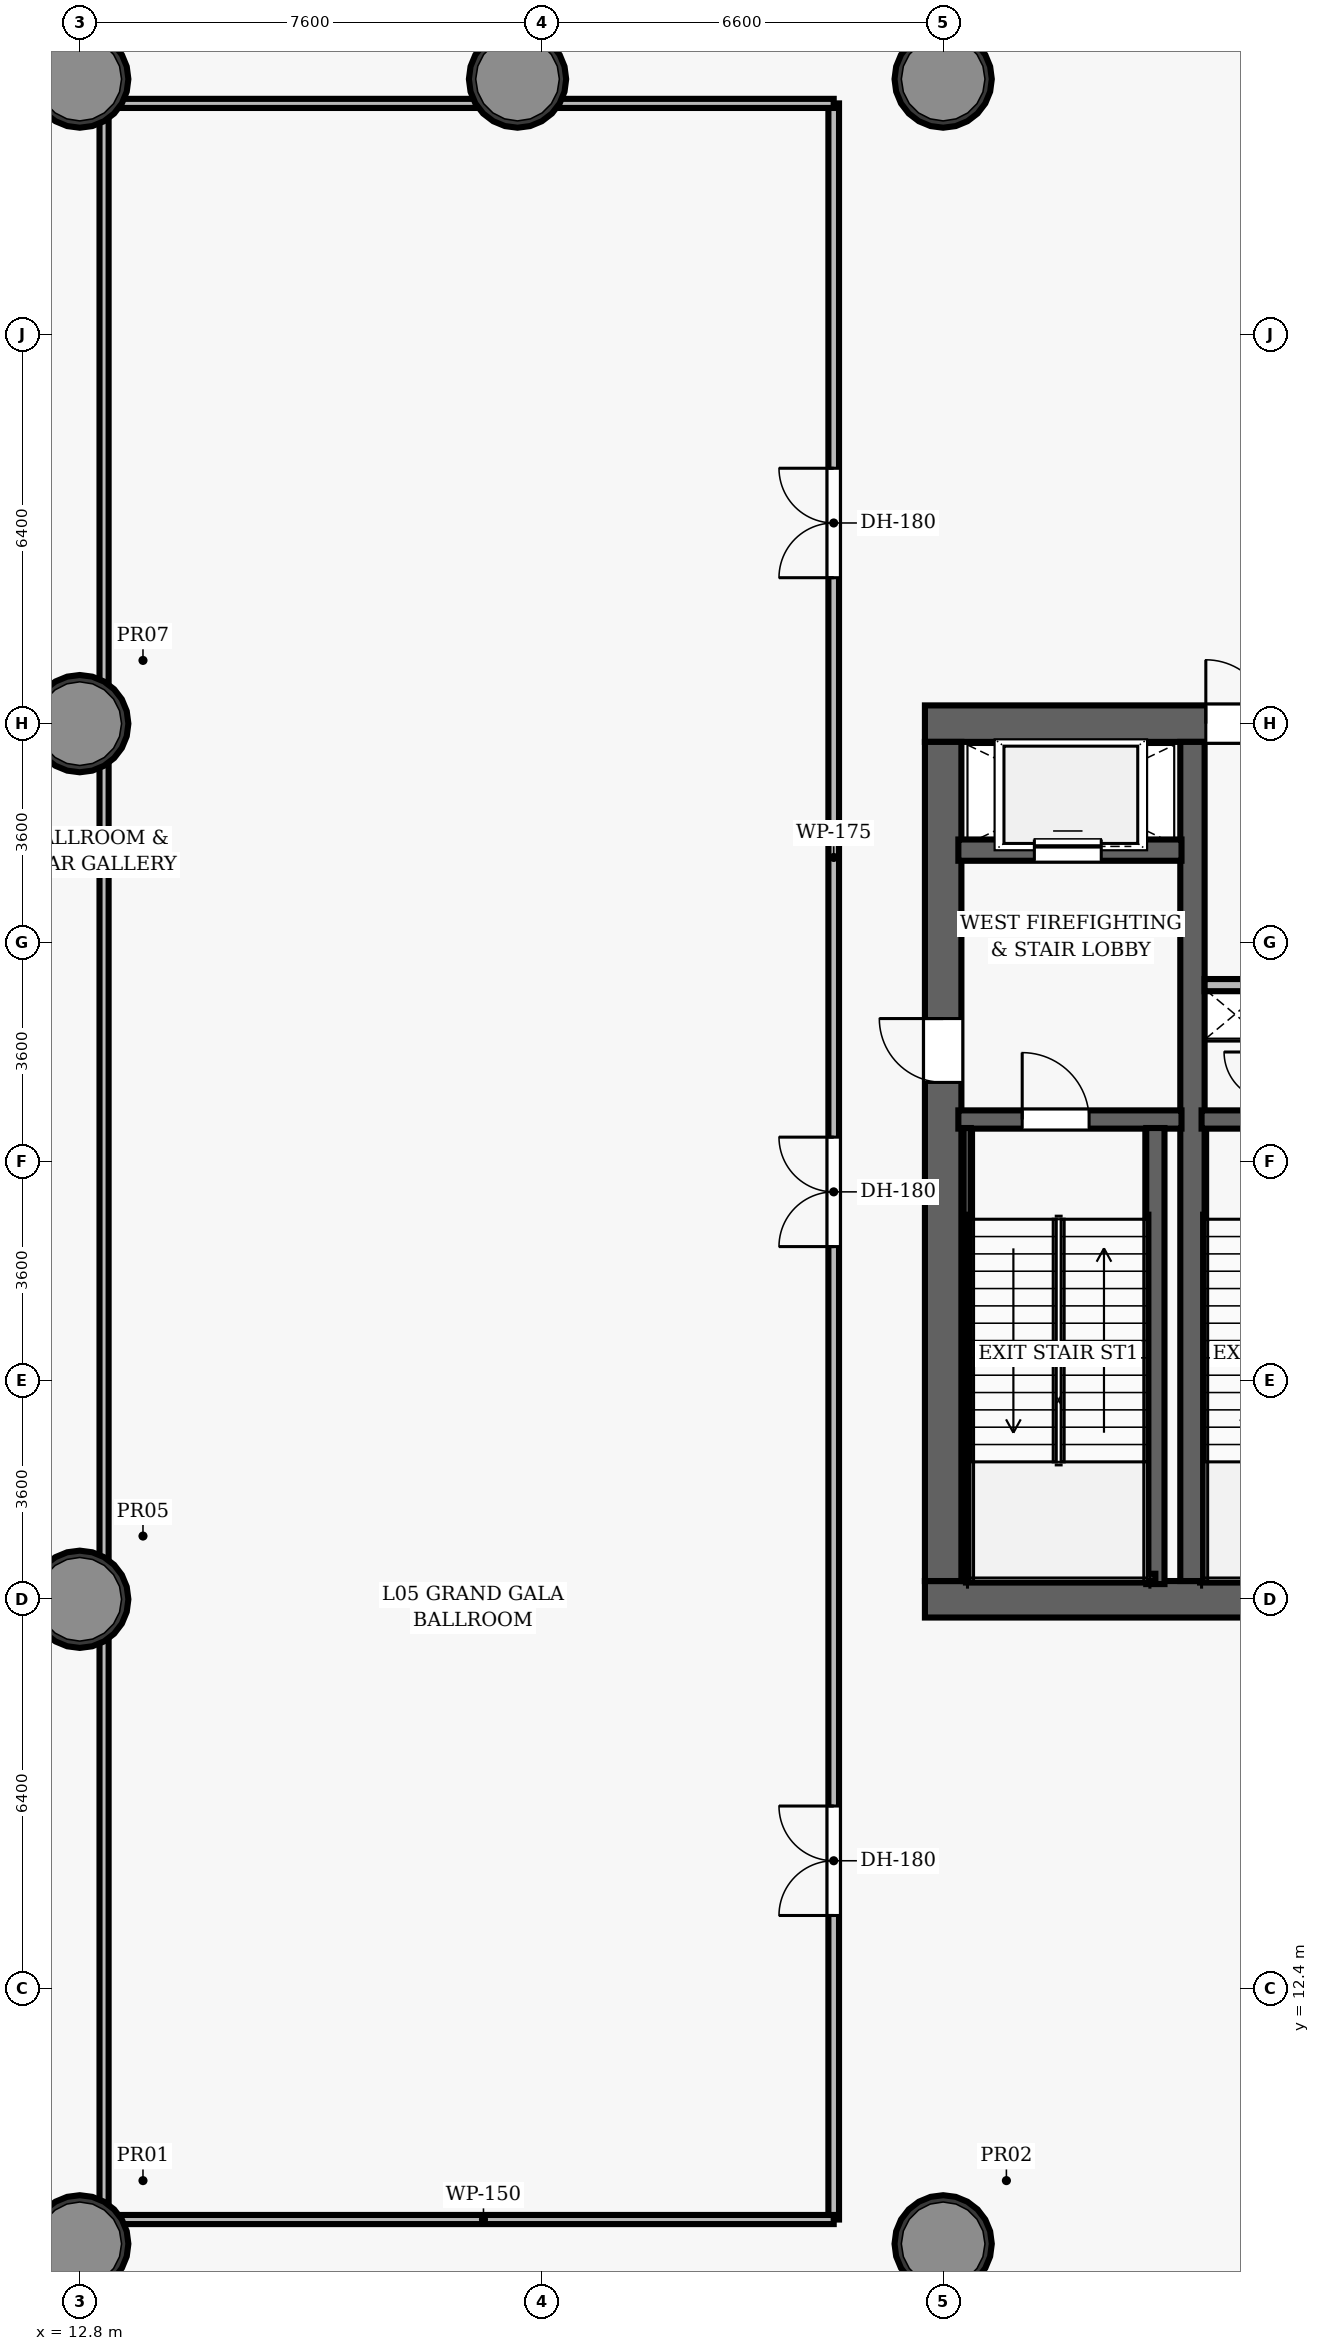
"""IFC4 building model, lengths in metres.
Left out: names, types, materials, properties, quantities, classifications, styles, units other than length and angle.
Written with IfcOpenShell. Run it as: python <this file> out.ifc"""

import sys

from ifc_helpers import new_model, si_unit, direction, frame, frame_2d, origin, origin_2d, place, context, subcontext, project, spatial, rectangle, hollow_circle, extrude, element, fill, save


model = new_model("IFC4")
c1 = context("Model", 3, precision=1e-05, world=origin(), true_north=direction((0.0, 1.0)))
c2 = subcontext(c1, "Body", "Model", "MODEL_VIEW")
j1 = project(units=[si_unit("LENGTHUNIT", "METRE"), si_unit("PLANEANGLEUNIT", "RADIAN")], contexts=[c1])
p1 = place(None, origin())
s1 = spatial("IfcSite", under=j1, at=p1, CompositionType="ELEMENT")
p2 = place(p1, origin())
s2 = spatial("IfcBuilding", under=s1, at=p2, CompositionType="ELEMENT")
p3 = place(p2, frame((0.0, 0.0, 30.0)))
s3 = spatial("IfcBuildingStorey", under=s2, at=p3, CompositionType="ELEMENT", Elevation=30.0)
p4 = place(p3, frame((26.7, 18.8, 0.0), z_axis=(0.0, 0.0, 1.0), x_axis=(1.0, 0.0, 0.0)))
e1 = element("IfcWall", 1, at=p4, inside=s3, PredefinedType="SHEAR", context=c2, shape_type="SweptSolid", body=[
    extrude(rectangle(XDim=22.6, YDim=0.6, at=frame_2d((11.3, 0.0))), origin(), (0.0, 0.0, 1.0), 5.4),
])
p5 = place(p4, frame((14.52, 0.0, 0.0)))
e2 = element("IfcOpeningElement", 2, at=p5, cuts=e1, PredefinedType="OPENING", context=c2, shape_type="SweptSolid", body=[
    extrude(rectangle(XDim=1.05, YDim=2.15, at=frame_2d((0.525, 1.075))), frame((0.0, 0.31, 0.0), z_axis=(0.0, -1.0, 0.0), x_axis=(1.0, 0.0, 0.0)), (0.0, 0.0, 1.0), 0.62),
])
p6 = place(p3, frame((26.7, 33.2, 0.0), z_axis=(0.0, 0.0, 1.0), x_axis=(1.0, 0.0, 0.0)))
e3 = element("IfcWall", 3, at=p6, inside=s3, PredefinedType="SHEAR", context=c2, shape_type="SweptSolid", body=[
    extrude(rectangle(XDim=22.6, YDim=0.6, at=frame_2d((11.3, 0.0))), origin(), (0.0, 0.0, 1.0), 5.4),
])
p7 = place(p6, frame((4.62, 0.0, 0.0)))
e4 = element("IfcOpeningElement", 4, at=p7, cuts=e3, PredefinedType="OPENING", context=c2, shape_type="SweptSolid", body=[
    extrude(rectangle(XDim=1.05, YDim=2.15, at=frame_2d((0.525, 1.075))), frame((0.0, 0.31, 0.0), z_axis=(0.0, -1.0, 0.0), x_axis=(1.0, 0.0, 0.0)), (0.0, 0.0, 1.0), 0.62),
])
p8 = place(p6, frame((14.52, 0.0, 0.0)))
e5 = element("IfcOpeningElement", 5, at=p8, cuts=e3, PredefinedType="OPENING", context=c2, shape_type="SweptSolid", body=[
    extrude(rectangle(XDim=1.05, YDim=2.15, at=frame_2d((0.525, 1.075))), frame((0.0, 0.31, 0.0), z_axis=(0.0, -1.0, 0.0), x_axis=(1.0, 0.0, 0.0)), (0.0, 0.0, 1.0), 0.62),
])
p9 = place(p3, frame((27.0, 19.1, 0.0), z_axis=(0.0, 0.0, 1.0), x_axis=(0.0, 1.0, 0.0)))
e6 = element("IfcWall", 6, at=p9, inside=s3, PredefinedType="SHEAR", context=c2, shape_type="SweptSolid", body=[
    extrude(rectangle(XDim=13.8, YDim=0.6, at=frame_2d((6.9, 0.0))), origin(), (0.0, 0.0, 1.0), 5.4),
])
p10 = place(p9, frame((8.2, 0.0, 0.0)))
e7 = element("IfcOpeningElement", 7, at=p10, cuts=e6, PredefinedType="OPENING", context=c2, shape_type="SweptSolid", body=[
    extrude(rectangle(XDim=1.05, YDim=2.15, at=frame_2d((0.525, 1.075))), frame((0.0, 0.31, 0.0), z_axis=(0.0, -1.0, 0.0), x_axis=(1.0, 0.0, 0.0)), (0.0, 0.0, 1.0), 0.62),
])
p11 = place(p3, frame((31.1, 19.1, 0.0), z_axis=(0.0, 0.0, 1.0), x_axis=(0.0, 1.0, 0.0)))
e8 = element("IfcWall", 8, at=p11, inside=s3, PredefinedType="SHEAR", context=c2, shape_type="SweptSolid", body=[
    extrude(rectangle(XDim=13.8, YDim=0.4, at=frame_2d((6.9, 0.0))), origin(), (0.0, 0.0, 1.0), 5.4),
])
for number, where, z_axis, x_axis in (
    (9, (12.8, 8.2, 0.0), (0.0, 0.0, 1.0), (1.0, 0.0, 0.0)),
    (10, (27.0, 8.2, 0.0), (0.0, 0.0, 1.0), (1.0, 0.0, 0.0)),
    (11, (12.8, 18.8, 0.0), (0.0, 0.0, 1.0), (1.0, 0.0, 0.0)),
    (12, (12.8, 33.2, 0.0), (0.0, 0.0, 1.0), (1.0, 0.0, 0.0)),
    (13, (12.8, 43.8, 0.0), (0.0, 0.0, 1.0), (1.0, 0.0, 0.0)),
    (14, (20.0, 43.8, 0.0), (0.0, 0.0, 1.0), (1.0, 0.0, 0.0)),
    (15, (27.0, 43.8, 0.0), (0.0, 0.0, 1.0), (1.0, 0.0, 0.0)),
):
    element("IfcColumn", number, at=place(p3, frame(where, z_axis=z_axis, x_axis=x_axis)), inside=s3, PredefinedType="COLUMN", context=c2, shape_type="SweptSolid", body=[
        extrude(hollow_circle(Radius=0.8, WallThickness=0.06, at=origin_2d()), origin(), (0.0, 0.0, 1.0), 5.4),
    ])
p12 = place(p3, frame((27.25, 26.69, 0.0), z_axis=(0.0, 0.0, 1.0), x_axis=(1.0, 0.0, 0.0)))
e16 = element("IfcWall", 16, at=p12, inside=s3, PredefinedType="SHEAR", context=c2, shape_type="SweptSolid", body=[
    extrude(rectangle(XDim=3.67, YDim=0.3, at=frame_2d((1.835, 0.0))), origin(), (0.0, 0.0, 1.0), 5.4),
])
p13 = place(p12, frame((1.05, 0.0, 0.0)))
e17 = element("IfcOpeningElement", 17, at=p13, cuts=e16, PredefinedType="OPENING", context=c2, shape_type="SweptSolid", body=[
    extrude(rectangle(XDim=1.1, YDim=2.15, at=frame_2d((0.55, 1.075))), frame((0.0, 0.16, 0.0), z_axis=(0.0, -1.0, 0.0), x_axis=(1.0, 0.0, 0.0)), (0.0, 0.0, 1.0), 0.32),
])
p14 = place(p3, frame((30.49, 19.05, 0.0), z_axis=(0.0, 0.0, 1.0), x_axis=(0.0, 1.0, 0.0)))
e18 = element("IfcWall", 18, at=p14, inside=s3, PredefinedType="SHEAR", context=c2, shape_type="SweptSolid", body=[
    extrude(rectangle(XDim=7.5, YDim=0.3, at=frame_2d((3.75, 0.0))), origin(), (0.0, 0.0, 1.0), 5.4),
])
p15 = place(p3, frame((27.395, 19.1, 0.0), z_axis=(0.0, 0.0, 1.0), x_axis=(0.0, 1.0, 0.0)))
e19 = element("IfcWall", 19, at=p15, inside=s3, PredefinedType="SHEAR", context=c2, shape_type="SweptSolid", body=[
    extrude(rectangle(XDim=7.45, YDim=0.12, at=frame_2d((3.725, 0.0))), origin(), (0.0, 0.0, 1.0), 5.4),
])
p16 = place(p3, frame((27.395, 19.16, 0.0), z_axis=(0.0, 0.0, 1.0), x_axis=(1.0, 0.0, 0.0)))
e20 = element("IfcWall", 20, at=p16, inside=s3, PredefinedType="SHEAR", context=c2, shape_type="SweptSolid", body=[
    extrude(rectangle(XDim=3.095, YDim=0.12, at=frame_2d((1.547, 0.0))), origin(), (0.0, 0.0, 1.0), 5.4),
])
p17 = place(p3, frame((27.25, 31.12, 0.0), z_axis=(0.0, 0.0, 1.0), x_axis=(1.0, 0.0, 0.0)))
e21 = element("IfcWall", 21, at=p17, inside=s3, PredefinedType="SHEAR", context=c2, shape_type="SweptSolid", body=[
    extrude(rectangle(XDim=3.67, YDim=0.35, at=frame_2d((1.835, 0.0))), origin(), (0.0, 0.0, 1.0), 4.06),
])
p18 = place(p17, frame((1.25, 0.0, 0.0)))
e22 = element("IfcOpeningElement", 22, at=p18, cuts=e21, PredefinedType="OPENING", context=c2, shape_type="SweptSolid", body=[
    extrude(rectangle(XDim=1.1, YDim=2.15, at=frame_2d((0.55, 1.075))), frame((0.0, 0.185, 0.0), z_axis=(0.0, -1.0, 0.0), x_axis=(1.0, 0.0, 0.0)), (0.0, 0.0, 1.0), 0.37),
])
p19 = place(p3, frame((31.25, 26.69, 0.0), z_axis=(0.0, 0.0, 1.0), x_axis=(1.0, 0.0, 0.0)))
e23 = element("IfcWall", 23, at=p19, inside=s3, PredefinedType="SHEAR", context=c2, shape_type="SweptSolid", body=[
    extrude(rectangle(XDim=3.56, YDim=0.3, at=frame_2d((1.78, 0.0))), origin(), (0.0, 0.0, 1.0), 5.4),
])
p20 = place(p19, frame((1.55, 0.0, 0.0)))
e24 = element("IfcOpeningElement", 24, at=p20, cuts=e23, PredefinedType="OPENING", context=c2, shape_type="SweptSolid", body=[
    extrude(rectangle(XDim=1.1, YDim=2.15, at=frame_2d((0.55, 1.075))), frame((0.0, 0.16, 0.0), z_axis=(0.0, -1.0, 0.0), x_axis=(1.0, 0.0, 0.0)), (0.0, 0.0, 1.0), 0.32),
])
p21 = place(p3, frame((31.3, 19.16, 0.0), z_axis=(0.0, 0.0, 1.0), x_axis=(1.0, 0.0, 0.0)))
e25 = element("IfcWall", 25, at=p21, inside=s3, PredefinedType="SHEAR", context=c2, shape_type="SweptSolid", body=[
    extrude(rectangle(XDim=3.04, YDim=0.12, at=frame_2d((1.52, 0.0))), origin(), (0.0, 0.0, 1.0), 5.4),
])
p22 = place(p3, frame((31.3, 28.9, 0.0), z_axis=(0.0, 0.0, 1.0), x_axis=(1.0, 0.0, 0.0)))
e26 = element("IfcWall", 26, at=p22, inside=s3, PredefinedType="PARTITIONING", context=c2, shape_type="SweptSolid", body=[
    extrude(rectangle(XDim=1.12, YDim=0.2, at=frame_2d((0.56, 0.0))), origin(), (0.0, 0.0, 1.0), 4.06),
])
p23 = place(p3, frame((25.2, 8.6, 0.0), z_axis=(0.0, 0.0, 1.0), x_axis=(0.0, 1.0, 0.0)))
e27 = element("IfcWall", 27, at=p23, inside=s3, PredefinedType="PARTITIONING", context=c2, shape_type="SweptSolid", body=[
    extrude(rectangle(XDim=34.8, YDim=0.175, at=frame_2d((17.4, 0.0))), origin(), (0.0, 0.0, 1.0), 4.06),
])
p24 = place(p23, frame((5.0, 0.0, 0.0)))
e28 = element("IfcOpeningElement", 28, at=p24, cuts=e27, PredefinedType="OPENING", context=c2, shape_type="SweptSolid", body=[
    extrude(rectangle(XDim=1.8, YDim=2.35, at=frame_2d((0.9, 1.175))), frame((0.0, 0.097, 0.0), z_axis=(0.0, -1.0, 0.0), x_axis=(1.0, 0.0, 0.0)), (0.0, 0.0, 1.0), 0.195),
])
p25 = place(p23, frame((16.0, 0.0, 0.0)))
e29 = element("IfcOpeningElement", 29, at=p25, cuts=e27, PredefinedType="OPENING", context=c2, shape_type="SweptSolid", body=[
    extrude(rectangle(XDim=1.8, YDim=2.35, at=frame_2d((0.9, 1.175))), frame((0.0, 0.097, 0.0), z_axis=(0.0, -1.0, 0.0), x_axis=(1.0, 0.0, 0.0)), (0.0, 0.0, 1.0), 0.195),
])
p26 = place(p23, frame((27.0, 0.0, 0.0)))
e30 = element("IfcOpeningElement", 30, at=p26, cuts=e27, PredefinedType="OPENING", context=c2, shape_type="SweptSolid", body=[
    extrude(rectangle(XDim=1.8, YDim=2.35, at=frame_2d((0.9, 1.175))), frame((0.0, 0.097, 0.0), z_axis=(0.0, -1.0, 0.0), x_axis=(1.0, 0.0, 0.0)), (0.0, 0.0, 1.0), 0.195),
])
for number, where, z_axis, x_axis in (
    (31, (13.2, 8.6, 0.0), (0.0, 0.0, 1.0), (1.0, 0.0, 0.0)),
    (32, (13.2, 43.4, 0.0), (0.0, 0.0, 1.0), (1.0, 0.0, 0.0)),
):
    element("IfcWall", number, at=place(p3, frame(where, z_axis=z_axis, x_axis=x_axis)), inside=s3, PredefinedType="PARTITIONING", context=c2, shape_type="SweptSolid", body=[
        extrude(rectangle(XDim=12.0, YDim=0.15, at=frame_2d((6.0, 0.0))), origin(), (0.0, 0.0, 1.0), 4.06),
    ])
p27 = place(p3, frame((13.2, 8.6, 0.0), z_axis=(0.0, 0.0, 1.0), x_axis=(0.0, 1.0, 0.0)))
e33 = element("IfcWall", 33, at=p27, inside=s3, PredefinedType="PARTITIONING", context=c2, shape_type="SweptSolid", body=[
    extrude(rectangle(XDim=34.8, YDim=0.15, at=frame_2d((17.4, 0.0))), origin(), (0.0, 0.0, 1.0), 4.06),
])
p28 = place(p13, origin())
e34 = element("IfcDoor", 34, at=p28, inside=s3, OperationType="SINGLE_SWING_LEFT", PredefinedType="DOOR", context=c2, shape_type="SweptSolid", body=[
    extrude(rectangle(XDim=1.1, YDim=2.15, at=frame_2d((0.55, 1.075))), frame((0.0, 0.025, 0.0), z_axis=(0.0, -1.0, 0.0), x_axis=(1.0, 0.0, 0.0)), (0.0, 0.0, 1.0), 0.05),
])
fill(e17, e34)
p29 = place(p10, origin())
e35 = element("IfcDoor", 35, at=p29, inside=s3, OperationType="SINGLE_SWING_RIGHT", PredefinedType="DOOR", context=c2, shape_type="SweptSolid", body=[
    extrude(rectangle(XDim=1.05, YDim=2.15, at=frame_2d((0.525, 1.075))), frame((0.0, 0.025, 0.0), z_axis=(0.0, -1.0, 0.0), x_axis=(1.0, 0.0, 0.0)), (0.0, 0.0, 1.0), 0.05),
])
fill(e7, e35)
p30 = place(p7, origin())
e36 = element("IfcDoor", 36, at=p30, inside=s3, OperationType="SINGLE_SWING_LEFT", PredefinedType="DOOR", context=c2, shape_type="SweptSolid", body=[
    extrude(rectangle(XDim=1.05, YDim=2.15, at=frame_2d((0.525, 1.075))), frame((0.0, 0.025, 0.0), z_axis=(0.0, -1.0, 0.0), x_axis=(1.0, 0.0, 0.0)), (0.0, 0.0, 1.0), 0.05),
])
fill(e4, e36)
p31 = place(p24, origin())
e37 = element("IfcDoor", 37, at=p31, inside=s3, OperationType="DOUBLE_DOOR_SINGLE_SWING", PredefinedType="DOOR", context=c2, shape_type="SweptSolid", body=[
    extrude(rectangle(XDim=1.8, YDim=2.35, at=frame_2d((0.9, 1.175))), frame((0.0, 0.025, 0.0), z_axis=(0.0, -1.0, 0.0), x_axis=(1.0, 0.0, 0.0)), (0.0, 0.0, 1.0), 0.05),
])
fill(e28, e37)
p32 = place(p25, origin())
e38 = element("IfcDoor", 38, at=p32, inside=s3, OperationType="DOUBLE_DOOR_SINGLE_SWING", PredefinedType="DOOR", context=c2, shape_type="SweptSolid", body=[
    extrude(rectangle(XDim=1.8, YDim=2.35, at=frame_2d((0.9, 1.175))), frame((0.0, 0.025, 0.0), z_axis=(0.0, -1.0, 0.0), x_axis=(1.0, 0.0, 0.0)), (0.0, 0.0, 1.0), 0.05),
])
fill(e29, e38)
p33 = place(p26, origin())
e39 = element("IfcDoor", 39, at=p33, inside=s3, OperationType="DOUBLE_DOOR_SINGLE_SWING", PredefinedType="DOOR", context=c2, shape_type="SweptSolid", body=[
    extrude(rectangle(XDim=1.8, YDim=2.35, at=frame_2d((0.9, 1.175))), frame((0.0, 0.025, 0.0), z_axis=(0.0, -1.0, 0.0), x_axis=(1.0, 0.0, 0.0)), (0.0, 0.0, 1.0), 0.05),
])
fill(e30, e39)
p34 = place(p18, origin())
e40 = element("IfcDoor", 40, at=p34, inside=s3, OperationType="SLIDING_TO_LEFT", PredefinedType="DOOR", context=c2, shape_type="SweptSolid", body=[
    extrude(rectangle(XDim=1.1, YDim=2.15, at=frame_2d((0.55, 1.075))), frame((0.0, 0.025, 0.0), z_axis=(0.0, -1.0, 0.0), x_axis=(1.0, 0.0, 0.0)), (0.0, 0.0, 1.0), 0.05),
])
fill(e22, e40)
save(model, sys.argv[1])
